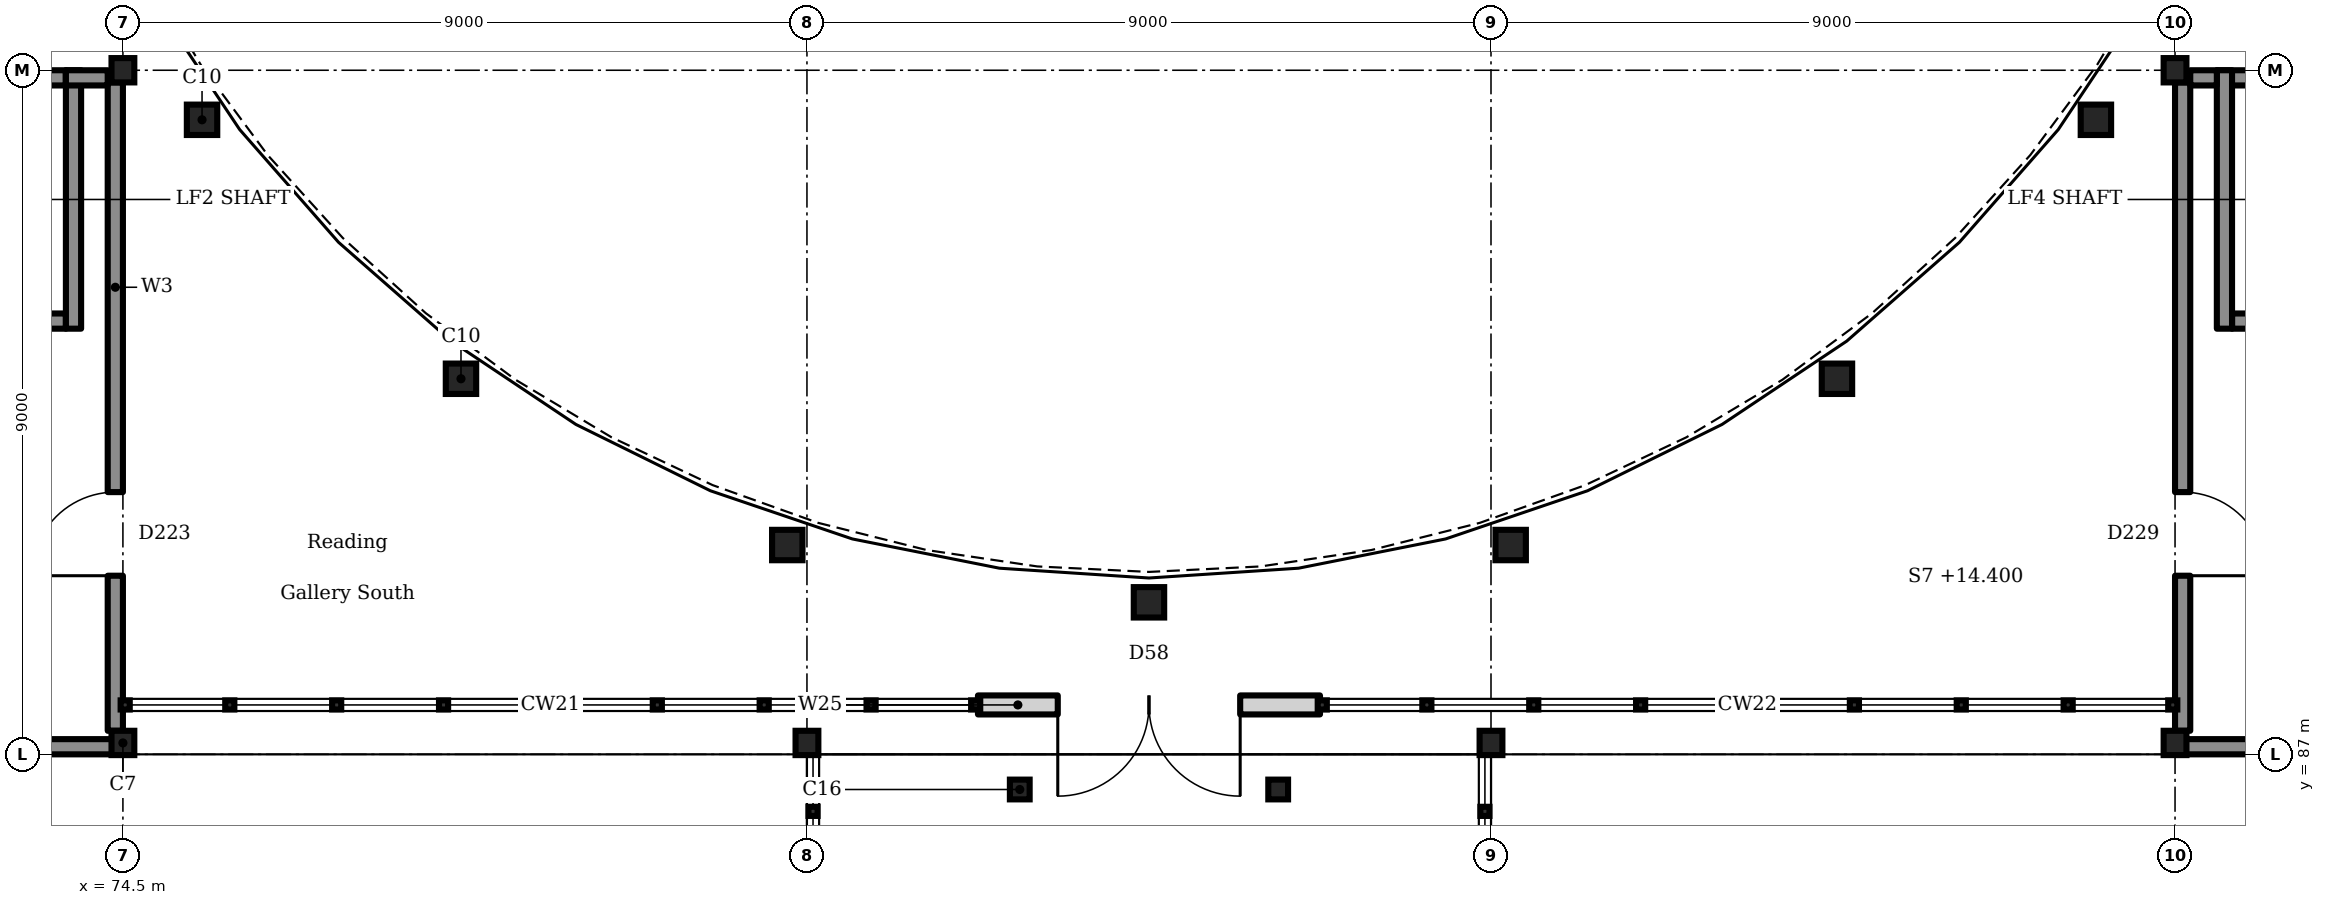
"""IFC4 building model, lengths in metres.
Left out: names, types, materials, properties, quantities, classifications, styles, units other than length and angle.
Written with IfcOpenShell. Run it as: python <this file> out.ifc"""

import sys

from ifc_helpers import new_model, si_unit, direction, frame, frame_2d, origin, origin_2d, place, context, subcontext, project, spatial, rectangle, hollow_circle, i_section, extrude, element, fill, save


model = new_model("IFC4")
c1 = context("Model", 3, precision=1e-05, world=origin(), true_north=direction((0.0, 1.0)))
c2 = subcontext(c1, "Body", "Model", "MODEL_VIEW")
j1 = project(units=[si_unit("LENGTHUNIT", "METRE"), si_unit("PLANEANGLEUNIT", "RADIAN")], contexts=[c1])
p1 = place(None, origin())
s1 = spatial("IfcSite", under=j1, at=p1, CompositionType="ELEMENT")
p2 = place(p1, origin())
s2 = spatial("IfcBuilding", under=s1, at=p2, CompositionType="ELEMENT")
p3 = place(p2, frame((0.0, 0.0, 14.4)))
s3 = spatial("IfcBuildingStorey", under=s2, at=p3, CompositionType="ELEMENT", Elevation=14.4)
p4 = place(p3, frame((71.15, 95.9, 0.0), z_axis=(0.0, 0.0, 1.0), x_axis=(1.0, 0.0, 0.0)))
e1 = element("IfcWall", 1, at=p4, inside=s3, PredefinedType="SOLIDWALL", context=c2, shape_type="SweptSolid", body=[
    extrude(rectangle(XDim=2.6, YDim=0.2, at=frame_2d((1.3, 0.0))), origin(), (0.0, 0.0, 1.0), 4.5),
])
p5 = place(p3, frame((71.15, 92.7, 0.0), z_axis=(0.0, 0.0, 1.0), x_axis=(1.0, 0.0, 0.0)))
e2 = element("IfcWall", 2, at=p5, inside=s3, PredefinedType="SOLIDWALL", context=c2, shape_type="SweptSolid", body=[
    extrude(rectangle(XDim=2.6, YDim=0.2, at=frame_2d((1.3, 0.0))), origin(), (0.0, 0.0, 1.0), 4.5),
])
p6 = place(p5, frame((0.85, 0.0, 0.0)))
e3 = element("IfcOpeningElement", 3, at=p6, cuts=e2, PredefinedType="OPENING", context=c2, shape_type="SweptSolid", body=[
    extrude(rectangle(XDim=1.1, YDim=2.1, at=frame_2d((0.55, 1.05))), frame((0.0, 0.11, 0.0), z_axis=(0.0, -1.0, 0.0), x_axis=(1.0, 0.0, 0.0)), (0.0, 0.0, 1.0), 0.22),
])
p7 = place(p3, frame((73.85, 92.6, 0.0), z_axis=(0.0, 0.0, 1.0), x_axis=(0.0, 1.0, 0.0)))
e4 = element("IfcWall", 4, at=p7, inside=s3, PredefinedType="SOLIDWALL", context=c2, shape_type="SweptSolid", body=[
    extrude(rectangle(XDim=3.4, YDim=0.2, at=frame_2d((1.7, 0.0))), origin(), (0.0, 0.0, 1.0), 4.5),
])
p8 = place(p3, frame((102.05, 95.9, 0.0), z_axis=(0.0, 0.0, 1.0), x_axis=(1.0, 0.0, 0.0)))
e5 = element("IfcWall", 5, at=p8, inside=s3, PredefinedType="SOLIDWALL", context=c2, shape_type="SweptSolid", body=[
    extrude(rectangle(XDim=2.6, YDim=0.2, at=frame_2d((1.3, 0.0))), origin(), (0.0, 0.0, 1.0), 4.5),
])
p9 = place(p3, frame((102.25, 92.7, 0.0), z_axis=(0.0, 0.0, 1.0), x_axis=(1.0, 0.0, 0.0)))
e6 = element("IfcWall", 6, at=p9, inside=s3, PredefinedType="SOLIDWALL", context=c2, shape_type="SweptSolid", body=[
    extrude(rectangle(XDim=2.4, YDim=0.2, at=frame_2d((1.2, 0.0))), origin(), (0.0, 0.0, 1.0), 4.5),
])
p10 = place(p9, frame((0.65, 0.0, 0.0)))
e7 = element("IfcOpeningElement", 7, at=p10, cuts=e6, PredefinedType="OPENING", context=c2, shape_type="SweptSolid", body=[
    extrude(rectangle(XDim=1.1, YDim=2.1, at=frame_2d((0.55, 1.05))), frame((0.0, 0.11, 0.0), z_axis=(0.0, -1.0, 0.0), x_axis=(1.0, 0.0, 0.0)), (0.0, 0.0, 1.0), 0.22),
])
p11 = place(p3, frame((102.15, 92.6, 0.0), z_axis=(0.0, 0.0, 1.0), x_axis=(0.0, 1.0, 0.0)))
e8 = element("IfcWall", 8, at=p11, inside=s3, PredefinedType="SOLIDWALL", context=c2, shape_type="SweptSolid", body=[
    extrude(rectangle(XDim=3.4, YDim=0.2, at=frame_2d((1.7, 0.0))), origin(), (0.0, 0.0, 1.0), 4.5),
])
for number, where, z_axis, x_axis in (
    (9, (74.5, 87.15, 0.0), (0.0, 0.0, 1.0), (1.0, 0.0, 0.0)),
    (10, (83.5, 87.15, 0.0), (0.0, 0.0, 1.0), (1.0, 0.0, 0.0)),
    (11, (92.5, 87.15, 0.0), (0.0, 0.0, 1.0), (1.0, 0.0, 0.0)),
    (12, (101.5, 87.15, 0.0), (0.0, 0.0, 1.0), (1.0, 0.0, 0.0)),
    (13, (74.5, 96.0, 0.0), (0.0, 0.0, 1.0), (1.0, 0.0, 0.0)),
    (14, (101.5, 96.0, 0.0), (0.0, 0.0, 1.0), (1.0, 0.0, 0.0)),
):
    element("IfcColumn", number, at=place(p3, frame(where, z_axis=z_axis, x_axis=x_axis)), inside=s3, PredefinedType="COLUMN", context=c2, shape_type="SweptSolid", body=[
        extrude(i_section(OverallWidth=0.3, OverallDepth=0.32, WebThickness=0.011, FlangeThickness=0.021, FilletRadius=0.027, at=origin_2d()), origin(), (0.0, 0.0, 1.0), 4.5),
    ])
for number, where, z_axis, x_axis in (
    (15, (75.541, 95.348, 0.0), (0.0, 0.0, 1.0), (1.0, 0.0, 0.0)),
    (16, (78.948, 91.941, 0.0), (0.0, 0.0, 1.0), (1.0, 0.0, 0.0)),
    (17, (83.241, 89.754, 0.0), (0.0, 0.0, 1.0), (1.0, 0.0, 0.0)),
    (18, (88.0, 89.0, 0.0), (0.0, 0.0, 1.0), (1.0, 0.0, 0.0)),
    (19, (92.759, 89.754, 0.0), (0.0, 0.0, 1.0), (1.0, 0.0, 0.0)),
    (20, (97.052, 91.941, 0.0), (0.0, 0.0, 1.0), (1.0, 0.0, 0.0)),
    (21, (100.459, 95.348, 0.0), (0.0, 0.0, 1.0), (1.0, 0.0, 0.0)),
):
    element("IfcColumn", number, at=place(p3, frame(where, z_axis=z_axis, x_axis=x_axis)), inside=s3, PredefinedType="COLUMN", context=c2, shape_type="SweptSolid", body=[
        extrude(hollow_circle(Radius=0.203, WallThickness=0.016, at=origin_2d()), origin(), (0.0, 0.0, 1.0), 4.5),
    ])
for number, where, z_axis, x_axis in (
    (22, (86.3, 86.538, 0.0), (0.0, 0.0, 1.0), (1.0, 0.0, 0.0)),
    (23, (89.7, 86.538, 0.0), (0.0, 0.0, 1.0), (1.0, 0.0, 0.0)),
):
    element("IfcColumn", number, at=place(p3, frame(where, z_axis=z_axis, x_axis=x_axis)), inside=s3, PredefinedType="COLUMN", context=c2, shape_type="SweptSolid", body=[
        extrude(i_section(OverallWidth=0.26, OverallDepth=0.26, WebThickness=0.01, FlangeThickness=0.018, FilletRadius=0.024, at=origin_2d()), origin(), (0.0, 0.0, 1.0), 4.5),
    ])
p12 = place(p3, frame((85.75, 87.65, 0.0), z_axis=(0.0, 0.0, 1.0), x_axis=(1.0, 0.0, 0.0)))
e24 = element("IfcWall", 24, at=p12, inside=s3, PredefinedType="SOLIDWALL", context=c2, shape_type="SweptSolid", body=[
    extrude(rectangle(XDim=4.5, YDim=0.25, at=frame_2d((2.25, 0.0))), origin(), (0.0, 0.0, 1.0), 4.15),
])
p13 = place(p12, frame((1.05, 0.0, 0.0)))
e25 = element("IfcOpeningElement", 25, at=p13, cuts=e24, PredefinedType="OPENING", context=c2, shape_type="SweptSolid", body=[
    extrude(rectangle(XDim=2.4, YDim=2.4, at=frame_2d((1.2, 1.2))), frame((0.0, 0.135, 0.0), z_axis=(0.0, -1.0, 0.0), x_axis=(1.0, 0.0, 0.0)), (0.0, 0.0, 1.0), 0.27),
])
p14 = place(p3, frame((74.4, 87.31, 0.0), z_axis=(0.0, 0.0, 1.0), x_axis=(0.0, 1.0, 0.0)))
e26 = element("IfcWall", 26, at=p14, inside=s3, PredefinedType="SOLIDWALL", context=c2, shape_type="SweptSolid", body=[
    extrude(rectangle(XDim=8.53, YDim=0.2, at=frame_2d((4.265, 0.0))), origin(), (0.0, 0.0, 1.0), 4.35),
])
p15 = place(p14, frame((2.04, 0.0, 0.0)))
e27 = element("IfcOpeningElement", 27, at=p15, cuts=e26, PredefinedType="OPENING", context=c2, shape_type="SweptSolid", body=[
    extrude(rectangle(XDim=1.1, YDim=2.1, at=frame_2d((0.55, 1.05))), frame((0.0, 0.11, 0.0), z_axis=(0.0, -1.0, 0.0), x_axis=(1.0, 0.0, 0.0)), (0.0, 0.0, 1.0), 0.22),
])
p16 = place(p3, frame((65.511, 87.1, 0.0), z_axis=(0.0, 0.0, 1.0), x_axis=(1.0, 0.0, 0.0)))
e28 = element("IfcWall", 28, at=p16, inside=s3, PredefinedType="SOLIDWALL", context=c2, shape_type="SweptSolid", body=[
    extrude(rectangle(XDim=8.978, YDim=0.2, at=frame_2d((4.489, 0.0))), origin(), (0.0, 0.0, 1.0), 4.35),
])
p17 = place(p16, frame((1.989, 0.0, 2.9)))
e29 = element("IfcOpeningElement", 29, at=p17, cuts=e28, PredefinedType="OPENING", context=c2, shape_type="SweptSolid", body=[
    extrude(rectangle(XDim=0.5, YDim=1.2, at=frame_2d((0.25, 0.6))), frame((0.0, 0.11, 0.0), z_axis=(0.0, -1.0, 0.0), x_axis=(1.0, 0.0, 0.0)), (0.0, 0.0, 1.0), 0.22),
])
p18 = place(p16, frame((6.489, 0.0, 2.9)))
e30 = element("IfcOpeningElement", 30, at=p18, cuts=e28, PredefinedType="OPENING", context=c2, shape_type="SweptSolid", body=[
    extrude(rectangle(XDim=0.5, YDim=1.2, at=frame_2d((0.25, 0.6))), frame((0.0, 0.11, 0.0), z_axis=(0.0, -1.0, 0.0), x_axis=(1.0, 0.0, 0.0)), (0.0, 0.0, 1.0), 0.22),
])
p19 = place(p3, frame((73.75, 95.9, 0.0), z_axis=(0.0, 0.0, 1.0), x_axis=(1.0, 0.0, 0.0)))
e31 = element("IfcWall", 31, at=p19, inside=s3, PredefinedType="SOLIDWALL", context=c2, shape_type="SweptSolid", body=[
    extrude(rectangle(XDim=0.55, YDim=0.2, at=frame_2d((0.275, 0.0))), origin(), (0.0, 0.0, 1.0), 4.5),
])
p20 = place(p3, frame((101.6, 87.31, 0.0), z_axis=(0.0, 0.0, 1.0), x_axis=(0.0, 1.0, 0.0)))
e32 = element("IfcWall", 32, at=p20, inside=s3, PredefinedType="SOLIDWALL", context=c2, shape_type="SweptSolid", body=[
    extrude(rectangle(XDim=8.53, YDim=0.2, at=frame_2d((4.265, 0.0))), origin(), (0.0, 0.0, 1.0), 4.35),
])
p21 = place(p20, frame((2.04, 0.0, 0.0)))
e33 = element("IfcOpeningElement", 33, at=p21, cuts=e32, PredefinedType="OPENING", context=c2, shape_type="SweptSolid", body=[
    extrude(rectangle(XDim=1.1, YDim=2.1, at=frame_2d((0.55, 1.05))), frame((0.0, 0.11, 0.0), z_axis=(0.0, -1.0, 0.0), x_axis=(1.0, 0.0, 0.0)), (0.0, 0.0, 1.0), 0.22),
])
p22 = place(p3, frame((101.511, 87.1, 0.0), z_axis=(0.0, 0.0, 1.0), x_axis=(1.0, 0.0, 0.0)))
e34 = element("IfcWall", 34, at=p22, inside=s3, PredefinedType="SOLIDWALL", context=c2, shape_type="SweptSolid", body=[
    extrude(rectangle(XDim=8.978, YDim=0.2, at=frame_2d((4.489, 0.0))), origin(), (0.0, 0.0, 1.0), 4.35),
])
p23 = place(p22, frame((1.989, 0.0, 2.9)))
e35 = element("IfcOpeningElement", 35, at=p23, cuts=e34, PredefinedType="OPENING", context=c2, shape_type="SweptSolid", body=[
    extrude(rectangle(XDim=0.5, YDim=1.2, at=frame_2d((0.25, 0.6))), frame((0.0, 0.11, 0.0), z_axis=(0.0, -1.0, 0.0), x_axis=(1.0, 0.0, 0.0)), (0.0, 0.0, 1.0), 0.22),
])
p24 = place(p22, frame((6.489, 0.0, 2.9)))
e36 = element("IfcOpeningElement", 36, at=p24, cuts=e34, PredefinedType="OPENING", context=c2, shape_type="SweptSolid", body=[
    extrude(rectangle(XDim=0.5, YDim=1.2, at=frame_2d((0.25, 0.6))), frame((0.0, 0.11, 0.0), z_axis=(0.0, -1.0, 0.0), x_axis=(1.0, 0.0, 0.0)), (0.0, 0.0, 1.0), 0.22),
])
p25 = place(p3, frame((101.7, 95.9, 0.0), z_axis=(0.0, 0.0, 1.0), x_axis=(1.0, 0.0, 0.0)))
e37 = element("IfcWall", 37, at=p25, inside=s3, PredefinedType="SOLIDWALL", context=c2, shape_type="SweptSolid", body=[
    extrude(rectangle(XDim=0.35, YDim=0.2, at=frame_2d((0.175, 0.0))), origin(), (0.0, 0.0, 1.0), 4.5),
])
p26 = place(p13, frame((2.4, 0.0, 0.0), z_axis=(0.0, 0.0, 1.0), x_axis=(-1.0, 0.0, 0.0)))
e38 = element("IfcDoor", 38, at=p26, inside=s3, OperationType="DOUBLE_DOOR_SINGLE_SWING", PredefinedType="DOOR", context=c2, shape_type="SweptSolid", body=[
    extrude(rectangle(XDim=2.4, YDim=2.4, at=frame_2d((1.2, 1.2))), frame((0.0, 0.025, 0.0), z_axis=(0.0, -1.0, 0.0), x_axis=(1.0, 0.0, 0.0)), (0.0, 0.0, 1.0), 0.05),
])
fill(e25, e38)
p27 = place(p15, origin())
e39 = element("IfcDoor", 39, at=p27, inside=s3, OperationType="SINGLE_SWING_RIGHT", PredefinedType="DOOR", context=c2, shape_type="SweptSolid", body=[
    extrude(rectangle(XDim=1.1, YDim=2.1, at=frame_2d((0.55, 1.05))), frame((0.0, 0.025, 0.0), z_axis=(0.0, -1.0, 0.0), x_axis=(1.0, 0.0, 0.0)), (0.0, 0.0, 1.0), 0.05),
])
fill(e27, e39)
p28 = place(p21, frame((1.1, 0.0, 0.0), z_axis=(0.0, 0.0, 1.0), x_axis=(-1.0, 0.0, 0.0)))
e40 = element("IfcDoor", 40, at=p28, inside=s3, OperationType="SINGLE_SWING_LEFT", PredefinedType="DOOR", context=c2, shape_type="SweptSolid", body=[
    extrude(rectangle(XDim=1.1, YDim=2.1, at=frame_2d((0.55, 1.05))), frame((0.0, 0.025, 0.0), z_axis=(0.0, -1.0, 0.0), x_axis=(1.0, 0.0, 0.0)), (0.0, 0.0, 1.0), 0.05),
])
fill(e33, e40)
save(model, sys.argv[1])
